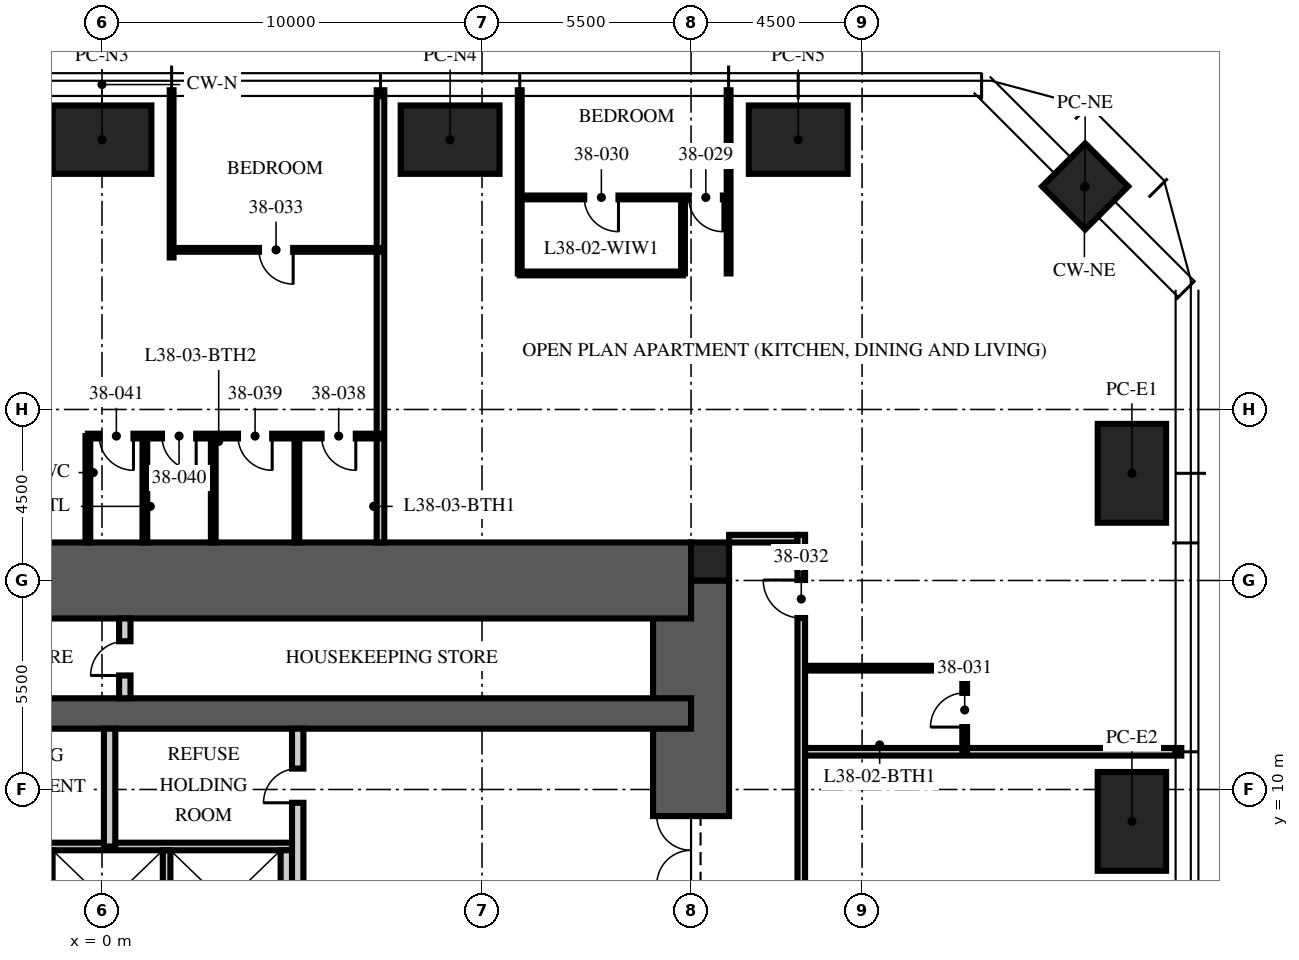
"""IFC4 building model, lengths in metres.
Left out: names, types, materials, properties, quantities, classifications, styles, units other than length and angle.
Written with IfcOpenShell. Run it as: python <this file> out.ifc"""

import sys

from ifc_helpers import new_model, si_unit, direction, frame, frame_2d, origin, origin_2d, place, context, subcontext, project, spatial, rectangle, extrude, element, fill, save


model = new_model("IFC4")
c1 = context("Model", 3, precision=1e-05, world=origin(), true_north=direction((0.0, 1.0)))
c2 = subcontext(c1, "Body", "Model", "MODEL_VIEW")
j1 = project(units=[si_unit("LENGTHUNIT", "METRE"), si_unit("PLANEANGLEUNIT", "RADIAN")], contexts=[c1])
p1 = place(None, origin())
s1 = spatial("IfcSite", under=j1, at=p1, CompositionType="ELEMENT")
p2 = place(p1, origin())
s2 = spatial("IfcBuilding", under=s1, at=p2, CompositionType="ELEMENT")
p3 = place(p2, frame((0.0, 0.0, 152.25)))
s3 = spatial("IfcBuildingStorey", under=s2, at=p3, CompositionType="ELEMENT", Elevation=152.25)
p4 = place(p3, frame((15.5, -15.5, -0.25), z_axis=(0.0, 0.0, 1.0), x_axis=(0.0, 1.0, 0.0)))
e1 = element("IfcWall", 1, at=p4, inside=s3, PredefinedType="SHEAR", context=c2, shape_type="SweptSolid", body=[
    extrude(rectangle(XDim=31.0, YDim=2.0, at=frame_2d((15.5, 0.0))), origin(), (0.0, 0.0, 1.0), 3.75),
])
p5 = place(p4, frame((6.5, 0.0, 0.25)))
e2 = element("IfcOpeningElement", 2, at=p5, cuts=e1, PredefinedType="OPENING", context=c2, shape_type="SweptSolid", body=[
    extrude(rectangle(XDim=1.2, YDim=2.1, at=frame_2d((0.6, 1.05))), frame((0.0, 1.01, 0.0), z_axis=(0.0, -1.0, 0.0), x_axis=(1.0, 0.0, 0.0)), (0.0, 0.0, 1.0), 2.02),
])
p6 = place(p4, frame((23.0, 0.0, 0.25)))
e3 = element("IfcOpeningElement", 3, at=p6, cuts=e1, PredefinedType="OPENING", context=c2, shape_type="SweptSolid", body=[
    extrude(rectangle(XDim=1.8, YDim=2.1, at=frame_2d((0.9, 1.05))), frame((0.0, 1.01, 0.0), z_axis=(0.0, -1.0, 0.0), x_axis=(1.0, 0.0, 0.0)), (0.0, 0.0, 1.0), 2.02),
])
p7 = place(p3, frame((-15.5, 15.5, -0.25), z_axis=(0.0, 0.0, 1.0), x_axis=(1.0, 0.0, 0.0)))
e4 = element("IfcWall", 4, at=p7, inside=s3, PredefinedType="SHEAR", context=c2, shape_type="SweptSolid", body=[
    extrude(rectangle(XDim=31.0, YDim=2.0, at=frame_2d((15.5, 0.0))), origin(), (0.0, 0.0, 1.0), 3.75),
])
p8 = place(p7, frame((5.0, 0.0, 0.25)))
e5 = element("IfcOpeningElement", 5, at=p8, cuts=e4, PredefinedType="OPENING", context=c2, shape_type="SweptSolid", body=[
    extrude(rectangle(XDim=1.0, YDim=2.1, at=frame_2d((0.5, 1.05))), frame((0.0, 1.01, 0.0), z_axis=(0.0, -1.0, 0.0), x_axis=(1.0, 0.0, 0.0)), (0.0, 0.0, 1.0), 2.02),
])
p9 = place(p3, frame((-15.5, 12.0, -0.25), z_axis=(0.0, 0.0, 1.0), x_axis=(1.0, 0.0, 0.0)))
e6 = element("IfcWall", 6, at=p9, inside=s3, PredefinedType="SHEAR", context=c2, shape_type="SweptSolid", body=[
    extrude(rectangle(XDim=31.0, YDim=0.8, at=frame_2d((15.5, 0.0))), origin(), (0.0, 0.0, 1.0), 3.75),
])
p10 = place(p3, frame((16.0, 16.0, -0.25), z_axis=(0.0, 0.0, 1.0), x_axis=(1.0, 0.0, 0.0)))
e7 = element("IfcColumn", 7, at=p10, inside=s3, PredefinedType="COLUMN", context=c2, shape_type="SweptSolid", body=[
    extrude(rectangle(XDim=1.0, YDim=1.0, at=origin_2d()), origin(), (0.0, 0.0, 1.0), 3.75),
])
for number, where, z_axis, x_axis in (
    (8, (0.0, 27.1, 0.0), (0.0, 0.0, 1.0), (1.0, 0.0, 0.0)),
    (9, (9.16, 27.1, 0.0), (0.0, 0.0, 1.0), (1.0, 0.0, 0.0)),
    (10, (18.32, 27.1, 0.0), (0.0, 0.0, 1.0), (1.0, 0.0, 0.0)),
    (11, (27.1, 18.32, 0.0), (0.0, 0.0, 1.0), (0.0, 1.0, 0.0)),
    (12, (27.1, 9.16, 0.0), (0.0, 0.0, 1.0), (0.0, 1.0, 0.0)),
):
    element("IfcColumn", number, at=place(p3, frame(where, z_axis=z_axis, x_axis=x_axis)), inside=s3, PredefinedType="COLUMN", context=c2, shape_type="SweptSolid", body=[
        extrude(rectangle(XDim=2.6, YDim=1.8, at=origin_2d()), origin(), (0.0, 0.0, 1.0), 3.75),
    ])
p11 = place(p3, frame((25.87, 25.87, 0.0), z_axis=(0.0, 0.0, 1.0), x_axis=(0.707106781187, -0.707106781187, 0.0)))
e13 = element("IfcColumn", 13, at=p11, inside=s3, PredefinedType="COLUMN", context=c2, shape_type="SweptSolid", body=[
    extrude(rectangle(XDim=1.6, YDim=1.6, at=origin_2d()), origin(), (0.0, 0.0, 1.0), 3.75),
])
p12 = place(p3, frame((-4.7, 8.5, 0.0), z_axis=(0.0, 0.0, 1.0), x_axis=(1.0, 0.0, 0.0)))
e14 = element("IfcWall", 14, at=p12, inside=s3, PredefinedType="PARTITIONING", context=c2, shape_type="SweptSolid", body=[
    extrude(rectangle(XDim=9.7, YDim=0.2, at=frame_2d((4.85, 0.0))), origin(), (0.0, 0.0, 1.0), 3.5),
])
p13 = place(p3, frame((4.85, 5.6, 0.0), z_axis=(0.0, 0.0, 1.0), x_axis=(0.0, 1.0, 0.0)))
e15 = element("IfcWall", 15, at=p13, inside=s3, PredefinedType="PARTITIONING", context=c2, shape_type="SweptSolid", body=[
    extrude(rectangle(XDim=2.8, YDim=0.3, at=frame_2d((1.4, 0.0))), origin(), (0.0, 0.0, 1.0), 3.5),
])
for number, where, z_axis, x_axis in (
    (16, (-1.4, 5.6, 0.0), (0.0, 0.0, 1.0), (0.0, 1.0, 0.0)),
    (17, (1.7, 5.6, 0.0), (0.0, 0.0, 1.0), (0.0, 1.0, 0.0)),
):
    element("IfcWall", number, at=place(p3, frame(where, z_axis=z_axis, x_axis=x_axis)), inside=s3, PredefinedType="PARTITIONING", context=c2, shape_type="SweptSolid", body=[
        extrude(rectangle(XDim=2.8, YDim=0.2, at=frame_2d((1.4, 0.0))), origin(), (0.0, 0.0, 1.0), 3.5),
    ])
p14 = place(p3, frame((5.15, 5.3, 0.0), z_axis=(0.0, 0.0, 1.0), x_axis=(0.0, 1.0, 0.0)))
e18 = element("IfcWall", 18, at=p14, inside=s3, PredefinedType="PARTITIONING", context=c2, shape_type="SweptSolid", body=[
    extrude(rectangle(XDim=6.3, YDim=0.3, at=frame_2d((3.15, 0.0))), origin(), (0.0, 0.0, 1.0), 3.5),
])
p15 = place(p14, frame((4.35, 0.0, 0.0)))
e19 = element("IfcOpeningElement", 19, at=p15, cuts=e18, PredefinedType="OPENING", context=c2, shape_type="SweptSolid", body=[
    extrude(rectangle(XDim=0.9, YDim=2.1, at=frame_2d((0.45, 1.05))), frame((0.0, 0.16, 0.0), z_axis=(0.0, -1.0, 0.0), x_axis=(1.0, 0.0, 0.0)), (0.0, 0.0, 1.0), 0.32),
])
p16 = place(p3, frame((0.2, 8.5, 0.0), z_axis=(0.0, 0.0, 1.0), x_axis=(0.0, 1.0, 0.0)))
e20 = element("IfcWall", 20, at=p16, inside=s3, PredefinedType="PARTITIONING", context=c2, shape_type="SweptSolid", body=[
    extrude(rectangle(XDim=3.1, YDim=0.3, at=frame_2d((1.55, 0.0))), origin(), (0.0, 0.0, 1.0), 3.5),
])
p17 = place(p3, frame((0.6, 12.4, 0.0), z_axis=(0.0, 0.0, 1.0), x_axis=(0.0, 1.0, 0.0)))
e21 = element("IfcWall", 21, at=p17, inside=s3, PredefinedType="PARTITIONING", context=c2, shape_type="SweptSolid", body=[
    extrude(rectangle(XDim=2.1, YDim=0.3, at=frame_2d((1.05, 0.0))), origin(), (0.0, 0.0, 1.0), 3.5),
])
p18 = place(p17, frame((0.6, 0.0, 0.0)))
e22 = element("IfcOpeningElement", 22, at=p18, cuts=e21, PredefinedType="OPENING", context=c2, shape_type="SweptSolid", body=[
    extrude(rectangle(XDim=0.9, YDim=2.1, at=frame_2d((0.45, 1.05))), frame((0.0, 0.16, 0.0), z_axis=(0.0, -1.0, 0.0), x_axis=(1.0, 0.0, 0.0)), (0.0, 0.0, 1.0), 0.32),
])
p19 = place(p3, frame((16.5, 16.6, 0.0), z_axis=(0.0, 0.0, 1.0), x_axis=(1.0, 0.0, 0.0)))
e23 = element("IfcWall", 23, at=p19, inside=s3, PredefinedType="PARTITIONING", context=c2, shape_type="SweptSolid", body=[
    extrude(rectangle(XDim=1.8, YDim=0.2, at=frame_2d((0.9, 0.0))), origin(), (0.0, 0.0, 1.0), 2.3),
])
p20 = place(p3, frame((18.5, 10.992, 0.0), z_axis=(0.0, 0.0, 1.0), x_axis=(1.0, 0.0, 0.0)))
e24 = element("IfcWall", 24, at=p20, inside=s3, PredefinedType="PARTITIONING", context=c2, shape_type="SweptSolid", body=[
    extrude(rectangle(XDim=9.9, YDim=0.2, at=frame_2d((4.95, 0.0))), origin(), (0.0, 0.0, 1.0), 2.81),
])
for number, where, z_axis, x_axis in (
    (25, (16.488, 23.58, 0.0), (0.0, 0.0, 1.0), (0.0, 1.0, 0.0)),
    (26, (10.992, 23.58, 0.0), (0.0, 0.0, 1.0), (0.0, 1.0, 0.0)),
):
    element("IfcWall", number, at=place(p3, frame(where, z_axis=z_axis, x_axis=x_axis)), inside=s3, PredefinedType="PARTITIONING", context=c2, shape_type="SweptSolid", body=[
        extrude(rectangle(XDim=4.82, YDim=0.1, at=frame_2d((2.41, 0.0))), origin(), (0.0, 0.0, 1.0), 2.81),
    ])
p21 = place(p3, frame((7.328, 16.5, 0.0), z_axis=(0.0, 0.0, 1.0), x_axis=(0.0, 1.0, 0.0)))
e27 = element("IfcWall", 27, at=p21, inside=s3, PredefinedType="PARTITIONING", context=c2, shape_type="SweptSolid", body=[
    extrude(rectangle(XDim=11.9, YDim=0.2, at=frame_2d((5.95, 0.0))), origin(), (0.0, 0.0, 1.0), 2.81),
])
p22 = place(p3, frame((1.832, 24.0, 0.0), z_axis=(0.0, 0.0, 1.0), x_axis=(0.0, 1.0, 0.0)))
e28 = element("IfcWall", 28, at=p22, inside=s3, PredefinedType="PARTITIONING", context=c2, shape_type="SweptSolid", body=[
    extrude(rectangle(XDim=4.4, YDim=0.1, at=frame_2d((2.2, 0.0))), origin(), (0.0, 0.0, 1.0), 2.81),
])
p23 = place(p3, frame((16.488, 25.58, 0.0), z_axis=(0.0, 0.0, 1.0), x_axis=(-1.0, 0.0, 0.0)))
e29 = element("IfcWall", 29, at=p23, inside=s3, PredefinedType="PARTITIONING", context=c2, shape_type="SweptSolid", body=[
    extrude(rectangle(XDim=5.496, YDim=0.1, at=frame_2d((2.748, 0.0))), origin(), (0.0, 0.0, 1.0), 2.81),
])
p24 = place(p23, frame((0.15, 0.0, 0.0)))
e30 = element("IfcOpeningElement", 30, at=p24, cuts=e29, PredefinedType="OPENING", context=c2, shape_type="SweptSolid", body=[
    extrude(rectangle(XDim=0.9, YDim=2.1, at=frame_2d((0.45, 1.05))), frame((0.0, 0.06, 0.0), z_axis=(0.0, -1.0, 0.0), x_axis=(1.0, 0.0, 0.0)), (0.0, 0.0, 1.0), 0.12),
])
p25 = place(p23, frame((2.898, 0.0, 0.0)))
e31 = element("IfcOpeningElement", 31, at=p25, cuts=e29, PredefinedType="OPENING", context=c2, shape_type="SweptSolid", body=[
    extrude(rectangle(XDim=0.9, YDim=2.1, at=frame_2d((0.45, 1.05))), frame((0.0, 0.06, 0.0), z_axis=(0.0, -1.0, 0.0), x_axis=(1.0, 0.0, 0.0)), (0.0, 0.0, 1.0), 0.12),
])
p26 = place(p3, frame((15.288, 23.58, 0.0), z_axis=(0.0, 0.0, 1.0), x_axis=(0.0, 1.0, 0.0)))
e32 = element("IfcWall", 32, at=p26, inside=s3, PredefinedType="PARTITIONING", context=c2, shape_type="SweptSolid", body=[
    extrude(rectangle(XDim=2.0, YDim=0.1, at=frame_2d((1.0, 0.0))), origin(), (0.0, 0.0, 1.0), 3.5),
])
p27 = place(p3, frame((15.288, 23.58, 0.0), z_axis=(0.0, 0.0, 1.0), x_axis=(-1.0, 0.0, 0.0)))
e33 = element("IfcWall", 33, at=p27, inside=s3, PredefinedType="PARTITIONING", context=c2, shape_type="SweptSolid", body=[
    extrude(rectangle(XDim=4.296, YDim=0.1, at=frame_2d((2.148, 0.0))), origin(), (0.0, 0.0, 1.0), 2.81),
])
p28 = place(p3, frame((22.7, 10.992, 0.0), z_axis=(0.0, 0.0, 1.0), x_axis=(0.0, 1.0, 0.0)))
e34 = element("IfcWall", 34, at=p28, inside=s3, PredefinedType="PARTITIONING", context=c2, shape_type="SweptSolid", body=[
    extrude(rectangle(XDim=2.2, YDim=0.125, at=frame_2d((1.1, 0.0))), origin(), (0.0, 0.0, 1.0), 3.5),
])
p29 = place(p28, frame((0.65, 0.0, 0.0)))
e35 = element("IfcOpeningElement", 35, at=p29, cuts=e34, PredefinedType="OPENING", context=c2, shape_type="SweptSolid", body=[
    extrude(rectangle(XDim=0.9, YDim=2.1, at=frame_2d((0.45, 1.05))), frame((0.0, 0.073, 0.0), z_axis=(0.0, -1.0, 0.0), x_axis=(1.0, 0.0, 0.0)), (0.0, 0.0, 1.0), 0.145),
])
p30 = place(p3, frame((18.5, 13.192, 0.0), z_axis=(0.0, 0.0, 1.0), x_axis=(1.0, 0.0, 0.0)))
e36 = element("IfcWall", 36, at=p30, inside=s3, PredefinedType="PARTITIONING", context=c2, shape_type="SweptSolid", body=[
    extrude(rectangle(XDim=4.2, YDim=0.125, at=frame_2d((2.1, 0.0))), origin(), (0.0, 0.0, 1.0), 3.5),
])
p31 = place(p3, frame((7.328, 24.2, 0.0), z_axis=(0.0, 0.0, 1.0), x_axis=(-1.0, 0.0, 0.0)))
e37 = element("IfcWall", 37, at=p31, inside=s3, PredefinedType="PARTITIONING", context=c2, shape_type="SweptSolid", body=[
    extrude(rectangle(XDim=5.496, YDim=0.1, at=frame_2d((2.748, 0.0))), origin(), (0.0, 0.0, 1.0), 2.81),
])
p32 = place(p31, frame((2.298, 0.0, 0.0)))
e38 = element("IfcOpeningElement", 38, at=p32, cuts=e37, PredefinedType="OPENING", context=c2, shape_type="SweptSolid", body=[
    extrude(rectangle(XDim=0.9, YDim=2.1, at=frame_2d((0.45, 1.05))), frame((0.0, 0.06, 0.0), z_axis=(0.0, -1.0, 0.0), x_axis=(1.0, 0.0, 0.0)), (0.0, 0.0, 1.0), 0.12),
])
p33 = place(p3, frame((7.328, 19.3, 0.0), z_axis=(0.0, 0.0, 1.0), x_axis=(-1.0, 0.0, 0.0)))
e39 = element("IfcWall", 39, at=p33, inside=s3, PredefinedType="PARTITIONING", context=c2, shape_type="SweptSolid", body=[
    extrude(rectangle(XDim=7.7, YDim=0.125, at=frame_2d((3.85, 0.0))), origin(), (0.0, 0.0, 1.0), 2.7),
])
p34 = place(p33, frame((0.65, 0.0, 0.0)))
e40 = element("IfcOpeningElement", 40, at=p34, cuts=e39, PredefinedType="OPENING", context=c2, shape_type="SweptSolid", body=[
    extrude(rectangle(XDim=0.9, YDim=2.1, at=frame_2d((0.45, 1.05))), frame((0.0, 0.073, 0.0), z_axis=(0.0, -1.0, 0.0), x_axis=(1.0, 0.0, 0.0)), (0.0, 0.0, 1.0), 0.145),
])
p35 = place(p33, frame((2.85, 0.0, 0.0)))
e41 = element("IfcOpeningElement", 41, at=p35, cuts=e39, PredefinedType="OPENING", context=c2, shape_type="SweptSolid", body=[
    extrude(rectangle(XDim=0.9, YDim=2.1, at=frame_2d((0.45, 1.05))), frame((0.0, 0.073, 0.0), z_axis=(0.0, -1.0, 0.0), x_axis=(1.0, 0.0, 0.0)), (0.0, 0.0, 1.0), 0.145),
])
p36 = place(p33, frame((4.85, 0.0, 0.0)))
e42 = element("IfcOpeningElement", 42, at=p36, cuts=e39, PredefinedType="OPENING", context=c2, shape_type="SweptSolid", body=[
    extrude(rectangle(XDim=0.9, YDim=2.1, at=frame_2d((0.45, 1.05))), frame((0.0, 0.073, 0.0), z_axis=(0.0, -1.0, 0.0), x_axis=(1.0, 0.0, 0.0)), (0.0, 0.0, 1.0), 0.145),
])
p37 = place(p33, frame((6.5, 0.0, 0.0)))
e43 = element("IfcOpeningElement", 43, at=p37, cuts=e39, PredefinedType="OPENING", context=c2, shape_type="SweptSolid", body=[
    extrude(rectangle(XDim=0.9, YDim=2.1, at=frame_2d((0.45, 1.05))), frame((0.0, 0.073, 0.0), z_axis=(0.0, -1.0, 0.0), x_axis=(1.0, 0.0, 0.0)), (0.0, 0.0, 1.0), 0.145),
])
for number, where, z_axis, x_axis in (
    (44, (5.128, 16.5, 0.0), (0.0, 0.0, 1.0), (0.0, 1.0, 0.0)),
    (45, (2.928, 16.5, 0.0), (0.0, 0.0, 1.0), (0.0, 1.0, 0.0)),
    (46, (1.128, 16.5, 0.0), (0.0, 0.0, 1.0), (0.0, 1.0, 0.0)),
    (47, (-0.372, 16.5, 0.0), (0.0, 0.0, 1.0), (0.0, 1.0, 0.0)),
):
    element("IfcWall", number, at=place(p3, frame(where, z_axis=z_axis, x_axis=x_axis)), inside=s3, PredefinedType="PARTITIONING", context=c2, shape_type="SweptSolid", body=[
        extrude(rectangle(XDim=2.8, YDim=0.125, at=frame_2d((1.4, 0.0))), origin(), (0.0, 0.0, 1.0), 3.5),
    ])
p38 = place(p3, frame((18.4, -5.328, 0.0), z_axis=(0.0, 0.0, 1.0), x_axis=(0.0, 1.0, 0.0)))
e48 = element("IfcWall", 48, at=p38, inside=s3, PredefinedType="PARTITIONING", context=c2, shape_type="SweptSolid", body=[
    extrude(rectangle(XDim=22.028, YDim=0.2, at=frame_2d((11.014, 0.0))), origin(), (0.0, 0.0, 1.0), 2.7),
])
p39 = place(p38, frame((19.84, 0.0, 0.0)))
e49 = element("IfcOpeningElement", 49, at=p39, cuts=e48, PredefinedType="OPENING", context=c2, shape_type="SweptSolid", body=[
    extrude(rectangle(XDim=1.0, YDim=2.2, at=frame_2d((0.5, 1.1))), frame((0.0, 0.11, 0.0), z_axis=(0.0, -1.0, 0.0), x_axis=(1.0, 0.0, 0.0)), (0.0, 0.0, 1.0), 0.22),
])
p40 = place(p6, origin())
e50 = element("IfcDoor", 50, at=p40, inside=s3, OperationType="DOUBLE_DOOR_SINGLE_SWING", PredefinedType="DOOR", context=c2, shape_type="SweptSolid", body=[
    extrude(rectangle(XDim=1.8, YDim=2.1, at=frame_2d((0.9, 1.05))), frame((0.0, 0.025, 0.0), z_axis=(0.0, -1.0, 0.0), x_axis=(1.0, 0.0, 0.0)), (0.0, 0.0, 1.0), 0.05),
])
fill(e3, e50)
p41 = place(p15, origin())
e51 = element("IfcDoor", 51, at=p41, inside=s3, OperationType="SINGLE_SWING_LEFT", PredefinedType="DOOR", context=c2, shape_type="SweptSolid", body=[
    extrude(rectangle(XDim=0.9, YDim=2.1, at=frame_2d((0.45, 1.05))), frame((0.0, 0.025, 0.0), z_axis=(0.0, -1.0, 0.0), x_axis=(1.0, 0.0, 0.0)), (0.0, 0.0, 1.0), 0.05),
])
fill(e19, e51)
p42 = place(p18, origin())
e52 = element("IfcDoor", 52, at=p42, inside=s3, OperationType="SINGLE_SWING_LEFT", PredefinedType="DOOR", context=c2, shape_type="SweptSolid", body=[
    extrude(rectangle(XDim=0.9, YDim=2.1, at=frame_2d((0.45, 1.05))), frame((0.0, 0.025, 0.0), z_axis=(0.0, -1.0, 0.0), x_axis=(1.0, 0.0, 0.0)), (0.0, 0.0, 1.0), 0.05),
])
fill(e22, e52)
p43 = place(p24, origin())
e53 = element("IfcDoor", 53, at=p43, inside=s3, OperationType="SINGLE_SWING_LEFT", PredefinedType="DOOR", context=c2, shape_type="SweptSolid", body=[
    extrude(rectangle(XDim=0.9, YDim=2.1, at=frame_2d((0.45, 1.05))), frame((0.0, 0.025, 0.0), z_axis=(0.0, -1.0, 0.0), x_axis=(1.0, 0.0, 0.0)), (0.0, 0.0, 1.0), 0.05),
])
fill(e30, e53)
p44 = place(p25, origin())
e54 = element("IfcDoor", 54, at=p44, inside=s3, OperationType="SINGLE_SWING_LEFT", PredefinedType="DOOR", context=c2, shape_type="SweptSolid", body=[
    extrude(rectangle(XDim=0.9, YDim=2.1, at=frame_2d((0.45, 1.05))), frame((0.0, 0.025, 0.0), z_axis=(0.0, -1.0, 0.0), x_axis=(1.0, 0.0, 0.0)), (0.0, 0.0, 1.0), 0.05),
])
fill(e31, e54)
p45 = place(p29, origin())
e55 = element("IfcDoor", 55, at=p45, inside=s3, OperationType="SINGLE_SWING_LEFT", PredefinedType="DOOR", context=c2, shape_type="SweptSolid", body=[
    extrude(rectangle(XDim=0.9, YDim=2.1, at=frame_2d((0.45, 1.05))), frame((0.0, 0.025, 0.0), z_axis=(0.0, -1.0, 0.0), x_axis=(1.0, 0.0, 0.0)), (0.0, 0.0, 1.0), 0.05),
])
fill(e35, e55)
p46 = place(p39, origin())
e56 = element("IfcDoor", 56, at=p46, inside=s3, OperationType="SINGLE_SWING_RIGHT", PredefinedType="DOOR", context=c2, shape_type="SweptSolid", body=[
    extrude(rectangle(XDim=1.0, YDim=2.2, at=frame_2d((0.5, 1.1))), frame((0.0, 0.025, 0.0), z_axis=(0.0, -1.0, 0.0), x_axis=(1.0, 0.0, 0.0)), (0.0, 0.0, 1.0), 0.05),
])
fill(e49, e56)
p47 = place(p32, origin())
e57 = element("IfcDoor", 57, at=p47, inside=s3, OperationType="SINGLE_SWING_LEFT", PredefinedType="DOOR", context=c2, shape_type="SweptSolid", body=[
    extrude(rectangle(XDim=0.9, YDim=2.1, at=frame_2d((0.45, 1.05))), frame((0.0, 0.025, 0.0), z_axis=(0.0, -1.0, 0.0), x_axis=(1.0, 0.0, 0.0)), (0.0, 0.0, 1.0), 0.05),
])
fill(e38, e57)
p48 = place(p34, origin())
e58 = element("IfcDoor", 58, at=p48, inside=s3, OperationType="SINGLE_SWING_LEFT", PredefinedType="DOOR", context=c2, shape_type="SweptSolid", body=[
    extrude(rectangle(XDim=0.9, YDim=2.1, at=frame_2d((0.45, 1.05))), frame((0.0, 0.025, 0.0), z_axis=(0.0, -1.0, 0.0), x_axis=(1.0, 0.0, 0.0)), (0.0, 0.0, 1.0), 0.05),
])
fill(e40, e58)
p49 = place(p35, origin())
e59 = element("IfcDoor", 59, at=p49, inside=s3, OperationType="SINGLE_SWING_LEFT", PredefinedType="DOOR", context=c2, shape_type="SweptSolid", body=[
    extrude(rectangle(XDim=0.9, YDim=2.1, at=frame_2d((0.45, 1.05))), frame((0.0, 0.025, 0.0), z_axis=(0.0, -1.0, 0.0), x_axis=(1.0, 0.0, 0.0)), (0.0, 0.0, 1.0), 0.05),
])
fill(e41, e59)
p50 = place(p36, origin())
e60 = element("IfcDoor", 60, at=p50, inside=s3, OperationType="SINGLE_SWING_LEFT", PredefinedType="DOOR", context=c2, shape_type="SweptSolid", body=[
    extrude(rectangle(XDim=0.9, YDim=2.1, at=frame_2d((0.45, 1.05))), frame((0.0, 0.025, 0.0), z_axis=(0.0, -1.0, 0.0), x_axis=(1.0, 0.0, 0.0)), (0.0, 0.0, 1.0), 0.05),
])
fill(e42, e60)
p51 = place(p37, origin())
e61 = element("IfcDoor", 61, at=p51, inside=s3, OperationType="SINGLE_SWING_LEFT", PredefinedType="DOOR", context=c2, shape_type="SweptSolid", body=[
    extrude(rectangle(XDim=0.9, YDim=2.1, at=frame_2d((0.45, 1.05))), frame((0.0, 0.025, 0.0), z_axis=(0.0, -1.0, 0.0), x_axis=(1.0, 0.0, 0.0)), (0.0, 0.0, 1.0), 0.05),
])
fill(e43, e61)
save(model, sys.argv[1])
